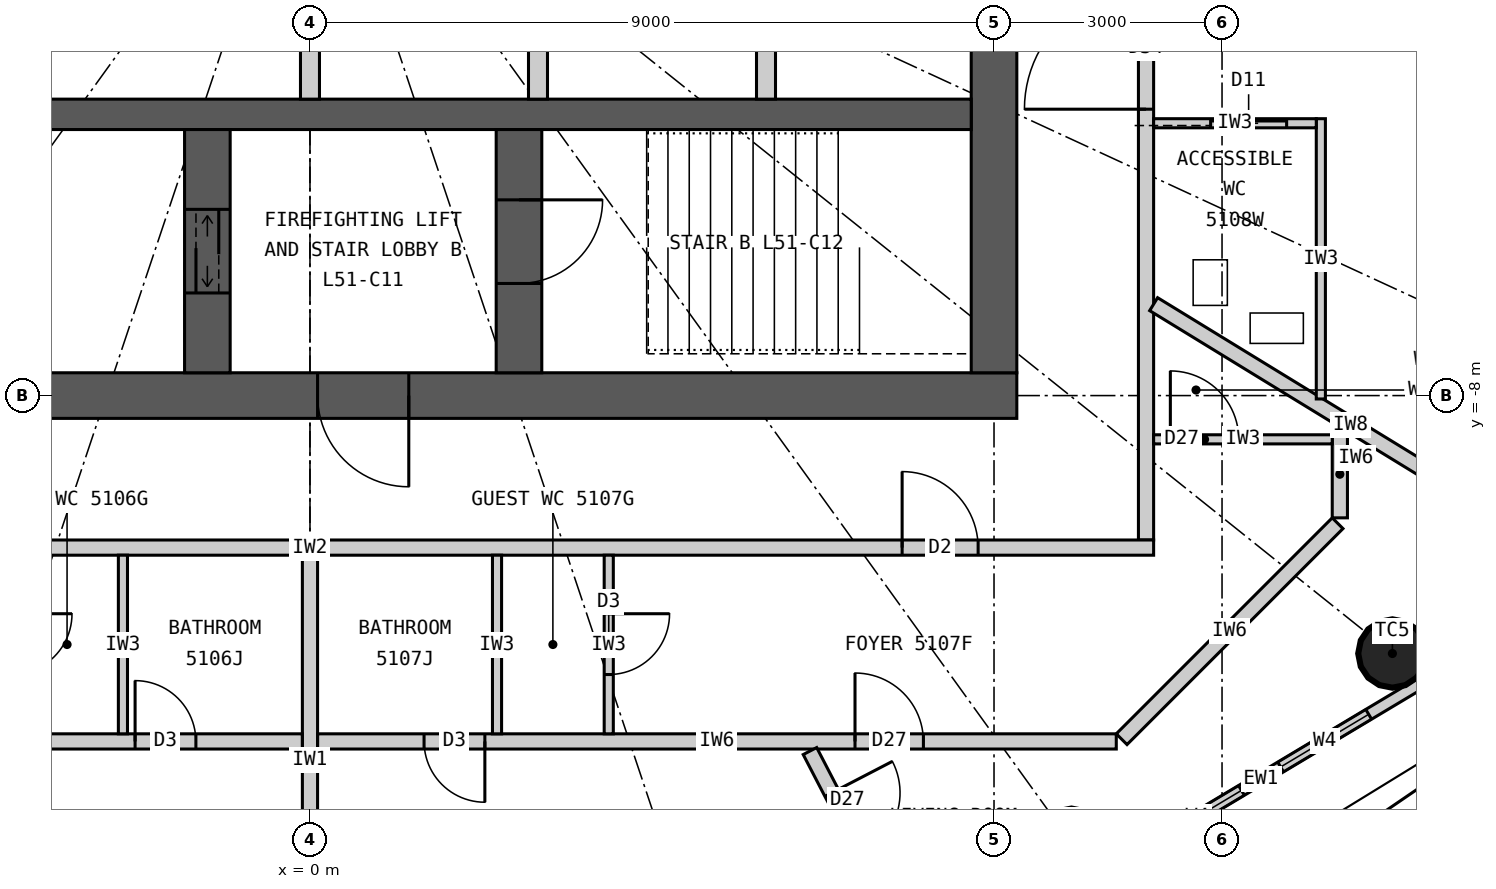
"""IFC4 building model, lengths in metres.
Left out: names, types, materials, properties, quantities, classifications, styles, units other than length and angle.
Written with IfcOpenShell. Run it as: python <this file> out.ifc"""

import sys

from ifc_helpers import new_model, si_unit, direction, frame, frame_2d, origin, origin_2d, place, context, subcontext, project, spatial, rectangle, circle, extrude, element, fill, save


model = new_model("IFC4")
c1 = context("Model", 3, precision=1e-05, world=origin(), true_north=direction((0.0, 1.0)))
c2 = subcontext(c1, "Body", "Model", "MODEL_VIEW")
j1 = project(units=[si_unit("LENGTHUNIT", "METRE"), si_unit("PLANEANGLEUNIT", "RADIAN")], contexts=[c1])
p1 = place(None, origin())
s1 = spatial("IfcSite", under=j1, at=p1, CompositionType="ELEMENT")
p2 = place(p1, origin())
s2 = spatial("IfcBuilding", under=s1, at=p2, CompositionType="ELEMENT")
p3 = place(p2, frame((0.0, 0.0, 192.9)))
s3 = spatial("IfcBuildingStorey", under=s2, at=p3, CompositionType="ELEMENT", Elevation=192.9)
for number, where, z_axis, x_axis in (
    (1, (10.019, -13.883, 0.0), (0.0, 0.0, 1.0), (1.0, 0.0, 0.0)),
    (2, (14.241, -11.393, 0.0), (0.0, 0.0, 1.0), (1.0, 0.0, 0.0)),
):
    element("IfcColumn", number, at=place(p3, frame(where, z_axis=z_axis, x_axis=x_axis)), inside=s3, PredefinedType="COLUMN", context=c2, shape_type="SweptSolid", body=[
        extrude(circle(Radius=0.45, at=origin_2d()), origin(), (0.0, 0.0, 1.0), 3.3),
    ])
p4 = place(p3, frame((9.3, -8.0, 0.0), z_axis=(0.0, 0.0, 1.0), x_axis=(-1.0, 0.0, 0.0)))
e3 = element("IfcWall", 3, at=p4, inside=s3, PredefinedType="SHEAR", context=c2, shape_type="SweptSolid", body=[
    extrude(rectangle(XDim=18.6, YDim=0.6, at=frame_2d((9.3, 0.0))), origin(), (0.0, 0.0, 1.0), 3.3),
])
p5 = place(p4, frame((8.0, 0.0, 0.0)))
e4 = element("IfcOpeningElement", 4, at=p5, cuts=e3, PredefinedType="OPENING", context=c2, shape_type="SweptSolid", body=[
    extrude(rectangle(XDim=1.2, YDim=2.2, at=frame_2d((0.6, 1.1))), frame((0.0, 0.31, 0.0), z_axis=(0.0, -1.0, 0.0), x_axis=(1.0, 0.0, 0.0)), (0.0, 0.0, 1.0), 0.62),
])
p6 = place(p4, frame((15.6, 0.0, 0.0)))
e5 = element("IfcOpeningElement", 5, at=p6, cuts=e3, PredefinedType="OPENING", context=c2, shape_type="SweptSolid", body=[
    extrude(rectangle(XDim=0.9, YDim=2.2, at=frame_2d((0.45, 1.1))), frame((0.0, 0.31, 0.0), z_axis=(0.0, -1.0, 0.0), x_axis=(1.0, 0.0, 0.0)), (0.0, 0.0, 1.0), 0.62),
])
p7 = place(p3, frame((9.0, -7.7, 0.0), z_axis=(0.0, 0.0, 1.0), x_axis=(0.0, 1.0, 0.0)))
e6 = element("IfcWall", 6, at=p7, inside=s3, PredefinedType="SHEAR", context=c2, shape_type="SweptSolid", body=[
    extrude(rectangle(XDim=15.4, YDim=0.6, at=frame_2d((7.7, 0.0))), origin(), (0.0, 0.0, 1.0), 3.3),
])
p8 = place(p7, frame((6.8, 0.0, 0.0)))
e7 = element("IfcOpeningElement", 7, at=p8, cuts=e6, PredefinedType="OPENING", context=c2, shape_type="SweptSolid", body=[
    extrude(rectangle(XDim=1.8, YDim=2.2, at=frame_2d((0.9, 1.1))), frame((0.0, 0.31, 0.0), z_axis=(0.0, -1.0, 0.0), x_axis=(1.0, 0.0, 0.0)), (0.0, 0.0, 1.0), 0.62),
])
p9 = place(p3, frame((-8.7, -4.3, 0.0), z_axis=(0.0, 0.0, 1.0), x_axis=(1.0, 0.0, 0.0)))
e8 = element("IfcWall", 8, at=p9, inside=s3, PredefinedType="SHEAR", context=c2, shape_type="SweptSolid", body=[
    extrude(rectangle(XDim=17.4, YDim=0.4, at=frame_2d((8.7, 0.0))), origin(), (0.0, 0.0, 1.0), 3.3),
])
p10 = place(p3, frame((2.75, -7.7, 0.0), z_axis=(0.0, 0.0, 1.0), x_axis=(0.0, 1.0, 0.0)))
e9 = element("IfcWall", 9, at=p10, inside=s3, PredefinedType="SHEAR", context=c2, shape_type="SweptSolid", body=[
    extrude(rectangle(XDim=3.2, YDim=0.6, at=frame_2d((1.6, 0.0))), origin(), (0.0, 0.0, 1.0), 3.3),
])
p11 = place(p10, frame((1.175, 0.0, 0.0)))
e10 = element("IfcOpeningElement", 10, at=p11, cuts=e9, PredefinedType="OPENING", context=c2, shape_type="SweptSolid", body=[
    extrude(rectangle(XDim=1.1, YDim=2.2, at=frame_2d((0.55, 1.1))), frame((0.0, 0.31, 0.0), z_axis=(0.0, -1.0, 0.0), x_axis=(1.0, 0.0, 0.0)), (0.0, 0.0, 1.0), 0.62),
])
p12 = place(p3, frame((-1.35, -7.7, 0.0), z_axis=(0.0, 0.0, 1.0), x_axis=(0.0, 1.0, 0.0)))
e11 = element("IfcWall", 11, at=p12, inside=s3, PredefinedType="SHEAR", context=c2, shape_type="SweptSolid", body=[
    extrude(rectangle(XDim=3.2, YDim=0.6, at=frame_2d((1.6, 0.0))), origin(), (0.0, 0.0, 1.0), 3.3),
])
p13 = place(p12, frame((1.05, 0.0, 0.0)))
e12 = element("IfcOpeningElement", 12, at=p13, cuts=e11, PredefinedType="OPENING", context=c2, shape_type="SweptSolid", body=[
    extrude(rectangle(XDim=1.1, YDim=2.2, at=frame_2d((0.55, 1.1))), frame((0.0, 0.31, 0.0), z_axis=(0.0, -1.0, 0.0), x_axis=(1.0, 0.0, 0.0)), (0.0, 0.0, 1.0), 0.62),
])
for number, where, z_axis, x_axis in (
    (13, (0.0, -4.1, 0.0), (0.0, 0.0, 1.0), (0.0, 1.0, 0.0)),
    (14, (3.0, -4.1, 0.0), (0.0, 0.0, 1.0), (0.0, 1.0, 0.0)),
    (15, (6.0, -4.1, 0.0), (0.0, 0.0, 1.0), (0.0, 1.0, 0.0)),
):
    element("IfcWall", number, at=place(p3, frame(where, z_axis=z_axis, x_axis=x_axis)), inside=s3, PredefinedType="PARTITIONING", context=c2, shape_type="SweptSolid", body=[
        extrude(rectangle(XDim=2.35, YDim=0.25, at=frame_2d((1.175, 0.0))), origin(), (0.0, 0.0, 1.0), 3.3),
    ])
p14 = place(p3, frame((10.346, -14.336, 0.0), z_axis=(0.0, 0.0, 1.0), x_axis=(0.85822150553, 0.513279502265, 0.0)))
e16 = element("IfcWall", 16, at=p14, inside=s3, PredefinedType="ELEMENTEDWALL", context=c2, shape_type="SweptSolid", body=[
    extrude(rectangle(XDim=5.05, YDim=0.15, at=frame_2d((2.525, 0.0))), origin(), (0.0, 0.0, 1.0), 3.12),
])
p15 = place(p14, frame((0.875, 0.0, 0.9)))
e17 = element("IfcOpeningElement", 17, at=p15, cuts=e16, PredefinedType="OPENING", context=c2, shape_type="SweptSolid", body=[
    extrude(rectangle(XDim=1.35, YDim=1.9, at=frame_2d((0.675, 0.95))), frame((0.0, 0.085, 0.0), z_axis=(0.0, -1.0, 0.0), x_axis=(1.0, 0.0, 0.0)), (0.0, 0.0, 1.0), 0.17),
])
p16 = place(p14, frame((2.825, 0.0, 0.9)))
e18 = element("IfcOpeningElement", 18, at=p16, cuts=e16, PredefinedType="OPENING", context=c2, shape_type="SweptSolid", body=[
    extrude(rectangle(XDim=1.35, YDim=1.9, at=frame_2d((0.675, 0.95))), frame((0.0, 0.085, 0.0), z_axis=(0.0, -1.0, 0.0), x_axis=(1.0, 0.0, 0.0)), (0.0, 0.0, 1.0), 0.17),
])
p17 = place(p3, frame((11.0, -9.9, 0.0), z_axis=(0.0, 0.0, 1.0), x_axis=(0.0, 1.0, 0.0)))
e19 = element("IfcWall", 19, at=p17, inside=s3, PredefinedType="PARTITIONING", context=c2, shape_type="SweptSolid", body=[
    extrude(rectangle(XDim=19.8, YDim=0.2, at=frame_2d((9.9, 0.0))), origin(), (0.0, 0.0, 1.0), 3.12),
])
p18 = place(p17, frame((11.486, 0.0, 0.0)))
e20 = element("IfcOpeningElement", 20, at=p18, cuts=e19, PredefinedType="OPENING", context=c2, shape_type="SweptSolid", body=[
    extrude(rectangle(XDim=1.0, YDim=2.2, at=frame_2d((0.5, 1.1))), frame((0.0, 0.11, 0.0), z_axis=(0.0, -1.0, 0.0), x_axis=(1.0, 0.0, 0.0)), (0.0, 0.0, 1.0), 0.22),
])
p19 = place(p17, frame((18.645, 0.0, 0.0)))
e21 = element("IfcOpeningElement", 21, at=p19, cuts=e19, PredefinedType="OPENING", context=c2, shape_type="SweptSolid", body=[
    extrude(rectangle(XDim=1.0, YDim=2.2, at=frame_2d((0.5, 1.1))), frame((0.0, 0.11, 0.0), z_axis=(0.0, -1.0, 0.0), x_axis=(1.0, 0.0, 0.0)), (0.0, 0.0, 1.0), 0.22),
])
p20 = place(p17, frame((5.668, 0.0, 0.0)))
e22 = element("IfcOpeningElement", 22, at=p20, cuts=e19, PredefinedType="OPENING", context=c2, shape_type="SweptSolid", body=[
    extrude(rectangle(XDim=1.6, YDim=2.2, at=frame_2d((0.8, 1.1))), frame((0.0, 0.11, 0.0), z_axis=(0.0, -1.0, 0.0), x_axis=(1.0, 0.0, 0.0)), (0.0, 0.0, 1.0), 0.22),
])
p21 = place(p3, frame((11.1, -10.0, 0.0), z_axis=(0.0, 0.0, 1.0), x_axis=(-1.0, 0.0, 0.0)))
e23 = element("IfcWall", 23, at=p21, inside=s3, PredefinedType="PARTITIONING", context=c2, shape_type="SweptSolid", body=[
    extrude(rectangle(XDim=22.2, YDim=0.2, at=frame_2d((11.1, 0.0))), origin(), (0.0, 0.0, 1.0), 3.12),
])
p22 = place(p21, frame((18.864, 0.0, 0.0)))
e24 = element("IfcOpeningElement", 24, at=p22, cuts=e23, PredefinedType="OPENING", context=c2, shape_type="SweptSolid", body=[
    extrude(rectangle(XDim=1.0, YDim=2.2, at=frame_2d((0.5, 1.1))), frame((0.0, 0.11, 0.0), z_axis=(0.0, -1.0, 0.0), x_axis=(1.0, 0.0, 0.0)), (0.0, 0.0, 1.0), 0.22),
])
p23 = place(p21, frame((2.309, 0.0, 0.0)))
e25 = element("IfcOpeningElement", 25, at=p23, cuts=e23, PredefinedType="OPENING", context=c2, shape_type="SweptSolid", body=[
    extrude(rectangle(XDim=1.0, YDim=2.2, at=frame_2d((0.5, 1.1))), frame((0.0, 0.11, 0.0), z_axis=(0.0, -1.0, 0.0), x_axis=(1.0, 0.0, 0.0)), (0.0, 0.0, 1.0), 0.22),
])
p24 = place(p3, frame((0.0, -10.1, 0.0), z_axis=(0.0, 0.0, 1.0), x_axis=(0.0, -1.0, 0.0)))
e26 = element("IfcWall", 26, at=p24, inside=s3, PredefinedType="PARTITIONING", context=c2, shape_type="SweptSolid", body=[
    extrude(rectangle(XDim=5.4, YDim=0.2, at=frame_2d((2.7, 0.0))), origin(), (0.0, 0.0, 1.0), 2.27),
])
p25 = place(p3, frame((11.1, -6.797, 0.0), z_axis=(0.0, 0.0, 1.0), x_axis=(0.852799818179, -0.522237943963, 0.0)))
e27 = element("IfcWall", 27, at=p25, inside=s3, PredefinedType="PARTITIONING", context=c2, shape_type="SweptSolid", body=[
    extrude(rectangle(XDim=6.077, YDim=0.2, at=frame_2d((3.039, 0.0))), origin(), (0.0, 0.0, 1.0), 3.12),
])
p26 = place(p3, frame((-10.609, -12.55, 0.0), z_axis=(0.0, 0.0, 1.0), x_axis=(1.0, 0.0, 0.0)))
e28 = element("IfcWall", 28, at=p26, inside=s3, PredefinedType="PARTITIONING", context=c2, shape_type="SweptSolid", body=[
    extrude(rectangle(XDim=10.508, YDim=0.2, at=frame_2d((5.254, 0.0))), origin(), (0.0, 0.0, 1.0), 3.12),
])
p27 = place(p26, frame((8.308, 0.0, 0.0)))
e29 = element("IfcOpeningElement", 29, at=p27, cuts=e28, PredefinedType="OPENING", context=c2, shape_type="SweptSolid", body=[
    extrude(rectangle(XDim=0.8, YDim=2.1, at=frame_2d((0.4, 1.05))), frame((0.0, 0.11, 0.0), z_axis=(0.0, -1.0, 0.0), x_axis=(1.0, 0.0, 0.0)), (0.0, 0.0, 1.0), 0.22),
])
p28 = place(p3, frame((-2.461, -10.1, 0.0), z_axis=(0.0, 0.0, 1.0), x_axis=(0.0, -1.0, 0.0)))
e30 = element("IfcWall", 30, at=p28, inside=s3, PredefinedType="PARTITIONING", context=c2, shape_type="SweptSolid", body=[
    extrude(rectangle(XDim=2.35, YDim=0.12, at=frame_2d((1.175, 0.0))), origin(), (0.0, 0.0, 1.0), 3.12),
])
p29 = place(p3, frame((0.101, -12.55, 0.0), z_axis=(0.0, 0.0, 1.0), x_axis=(1.0, 0.0, 0.0)))
e31 = element("IfcWall", 31, at=p29, inside=s3, PredefinedType="PARTITIONING", context=c2, shape_type="SweptSolid", body=[
    extrude(rectangle(XDim=10.508, YDim=0.2, at=frame_2d((5.254, 0.0))), origin(), (0.0, 0.0, 1.0), 3.12),
])
p30 = place(p29, frame((1.4, 0.0, 0.0)))
e32 = element("IfcOpeningElement", 32, at=p30, cuts=e31, PredefinedType="OPENING", context=c2, shape_type="SweptSolid", body=[
    extrude(rectangle(XDim=0.8, YDim=2.1, at=frame_2d((0.4, 1.05))), frame((0.0, 0.11, 0.0), z_axis=(0.0, -1.0, 0.0), x_axis=(1.0, 0.0, 0.0)), (0.0, 0.0, 1.0), 0.22),
])
p31 = place(p29, frame((7.07, 0.0, 0.0)))
e33 = element("IfcOpeningElement", 33, at=p31, cuts=e31, PredefinedType="OPENING", context=c2, shape_type="SweptSolid", body=[
    extrude(rectangle(XDim=0.9, YDim=2.1, at=frame_2d((0.45, 1.05))), frame((0.0, 0.11, 0.0), z_axis=(0.0, -1.0, 0.0), x_axis=(1.0, 0.0, 0.0)), (0.0, 0.0, 1.0), 0.22),
])
p32 = place(p3, frame((10.679, -12.521, 0.0), z_axis=(0.0, 0.0, 1.0), x_axis=(0.707106781187, 0.707106781187, 0.0)))
e34 = element("IfcWall", 34, at=p32, inside=s3, PredefinedType="PARTITIONING", context=c2, shape_type="SweptSolid", body=[
    extrude(rectangle(XDim=4.019, YDim=0.2, at=frame_2d((2.009, 0.0))), origin(), (0.0, 0.0, 1.0), 3.12),
])
p33 = place(p3, frame((13.55, -9.609, 0.0), z_axis=(0.0, 0.0, 1.0), x_axis=(0.0, 1.0, 0.0)))
e35 = element("IfcWall", 35, at=p33, inside=s3, PredefinedType="PARTITIONING", context=c2, shape_type="SweptSolid", body=[
    extrude(rectangle(XDim=1.148, YDim=0.2, at=frame_2d((0.574, 0.0))), origin(), (0.0, 0.0, 1.0), 3.12),
])
p34 = place(p3, frame((6.578, -12.677, 0.0), z_axis=(0.0, 0.0, 1.0), x_axis=(0.460620531465, -0.887597164255, 0.0)))
e36 = element("IfcWall", 36, at=p34, inside=s3, PredefinedType="PARTITIONING", context=c2, shape_type="SweptSolid", body=[
    extrude(rectangle(XDim=2.678, YDim=0.2, at=frame_2d((1.339, 0.0))), origin(), (0.0, 0.0, 1.0), 3.12),
])
p35 = place(p34, frame((0.62, 0.0, 0.0)))
e37 = element("IfcOpeningElement", 37, at=p35, cuts=e36, PredefinedType="OPENING", context=c2, shape_type="SweptSolid", body=[
    extrude(rectangle(XDim=0.9, YDim=2.1, at=frame_2d((0.45, 1.05))), frame((0.0, 0.11, 0.0), z_axis=(0.0, -1.0, 0.0), x_axis=(1.0, 0.0, 0.0)), (0.0, 0.0, 1.0), 0.22),
])
p36 = place(p3, frame((2.461, -10.1, 0.0), z_axis=(0.0, 0.0, 1.0), x_axis=(0.0, -1.0, 0.0)))
e38 = element("IfcWall", 38, at=p36, inside=s3, PredefinedType="PARTITIONING", context=c2, shape_type="SweptSolid", body=[
    extrude(rectangle(XDim=2.35, YDim=0.12, at=frame_2d((1.175, 0.0))), origin(), (0.0, 0.0, 1.0), 3.12),
])
p37 = place(p3, frame((3.931, -10.1, 0.0), z_axis=(0.0, 0.0, 1.0), x_axis=(0.0, -1.0, 0.0)))
e39 = element("IfcWall", 39, at=p37, inside=s3, PredefinedType="PARTITIONING", context=c2, shape_type="SweptSolid", body=[
    extrude(rectangle(XDim=2.35, YDim=0.12, at=frame_2d((1.175, 0.0))), origin(), (0.0, 0.0, 1.0), 3.12),
])
p38 = place(p37, frame((0.77, 0.0, 0.0)))
e40 = element("IfcOpeningElement", 40, at=p38, cuts=e39, PredefinedType="OPENING", context=c2, shape_type="SweptSolid", body=[
    extrude(rectangle(XDim=0.8, YDim=2.1, at=frame_2d((0.4, 1.05))), frame((0.0, 0.07, 0.0), z_axis=(0.0, -1.0, 0.0), x_axis=(1.0, 0.0, 0.0)), (0.0, 0.0, 1.0), 0.14),
])
p39 = place(p3, frame((11.1, -8.576, 0.0), z_axis=(0.0, 0.0, 1.0), x_axis=(1.0, 0.0, 0.0)))
e41 = element("IfcWall", 41, at=p39, inside=s3, PredefinedType="PARTITIONING", context=c2, shape_type="SweptSolid", body=[
    extrude(rectangle(XDim=2.35, YDim=0.12, at=frame_2d((1.175, 0.0))), origin(), (0.0, 0.0, 1.0), 3.12),
])
p40 = place(p39, frame((0.22, 0.0, 0.0)))
e42 = element("IfcOpeningElement", 42, at=p40, cuts=e41, PredefinedType="OPENING", context=c2, shape_type="SweptSolid", body=[
    extrude(rectangle(XDim=0.9, YDim=2.1, at=frame_2d((0.45, 1.05))), frame((0.0, 0.07, 0.0), z_axis=(0.0, -1.0, 0.0), x_axis=(1.0, 0.0, 0.0)), (0.0, 0.0, 1.0), 0.14),
])
p41 = place(p3, frame((13.3, -8.044, 0.0), z_axis=(0.0, 0.0, 1.0), x_axis=(0.0, 1.0, 0.0)))
e43 = element("IfcWall", 43, at=p41, inside=s3, PredefinedType="PARTITIONING", context=c2, shape_type="SweptSolid", body=[
    extrude(rectangle(XDim=3.687, YDim=0.12, at=frame_2d((1.844, 0.0))), origin(), (0.0, 0.0, 1.0), 3.12),
])
p42 = place(p3, frame((11.1, -4.417, 0.0), z_axis=(0.0, 0.0, 1.0), x_axis=(1.0, 0.0, 0.0)))
e44 = element("IfcWall", 44, at=p42, inside=s3, PredefinedType="PARTITIONING", context=c2, shape_type="SweptSolid", body=[
    extrude(rectangle(XDim=2.14, YDim=0.12, at=frame_2d((1.07, 0.0))), origin(), (0.0, 0.0, 1.0), 2.37),
])
p43 = place(p42, frame((0.75, 0.0, 0.0)))
e45 = element("IfcOpeningElement", 45, at=p43, cuts=e44, PredefinedType="OPENING", context=c2, shape_type="SweptSolid", body=[
    extrude(rectangle(XDim=1.0, YDim=2.2, at=frame_2d((0.5, 1.1))), frame((0.0, 0.07, 0.0), z_axis=(0.0, -1.0, 0.0), x_axis=(1.0, 0.0, 0.0)), (0.0, 0.0, 1.0), 0.14),
])
p44 = place(p15, origin())
e46 = element("IfcWindow", 46, at=p44, inside=s3, PartitioningType="SINGLE_PANEL", PredefinedType="WINDOW", context=c2, shape_type="SweptSolid", body=[
    extrude(rectangle(XDim=1.35, YDim=1.9, at=frame_2d((0.675, 0.95))), frame((0.0, 0.03, 0.0), z_axis=(0.0, -1.0, 0.0), x_axis=(1.0, 0.0, 0.0)), (0.0, 0.0, 1.0), 0.06),
])
fill(e17, e46)
p45 = place(p16, origin())
e47 = element("IfcWindow", 47, at=p45, inside=s3, PartitioningType="SINGLE_PANEL", PredefinedType="WINDOW", context=c2, shape_type="SweptSolid", body=[
    extrude(rectangle(XDim=1.35, YDim=1.9, at=frame_2d((0.675, 0.95))), frame((0.0, 0.03, 0.0), z_axis=(0.0, -1.0, 0.0), x_axis=(1.0, 0.0, 0.0)), (0.0, 0.0, 1.0), 0.06),
])
fill(e18, e47)
p46 = place(p27, origin())
e48 = element("IfcDoor", 48, at=p46, inside=s3, OperationType="SINGLE_SWING_LEFT", PredefinedType="DOOR", context=c2, shape_type="SweptSolid", body=[
    extrude(rectangle(XDim=0.8, YDim=2.1, at=frame_2d((0.4, 1.05))), frame((0.0, 0.025, 0.0), z_axis=(0.0, -1.0, 0.0), x_axis=(1.0, 0.0, 0.0)), (0.0, 0.0, 1.0), 0.05),
])
fill(e29, e48)
p47 = place(p23, origin())
e49 = element("IfcDoor", 49, at=p47, inside=s3, OperationType="SINGLE_SWING_RIGHT", PredefinedType="DOOR", context=c2, shape_type="SweptSolid", body=[
    extrude(rectangle(XDim=1.0, YDim=2.2, at=frame_2d((0.5, 1.1))), frame((0.0, 0.025, 0.0), z_axis=(0.0, -1.0, 0.0), x_axis=(1.0, 0.0, 0.0)), (0.0, 0.0, 1.0), 0.05),
])
fill(e25, e49)
p48 = place(p30, origin())
e50 = element("IfcDoor", 50, at=p48, inside=s3, OperationType="SINGLE_SWING_RIGHT", PredefinedType="DOOR", context=c2, shape_type="SweptSolid", body=[
    extrude(rectangle(XDim=0.8, YDim=2.1, at=frame_2d((0.4, 1.05))), frame((0.0, 0.025, 0.0), z_axis=(0.0, -1.0, 0.0), x_axis=(1.0, 0.0, 0.0)), (0.0, 0.0, 1.0), 0.05),
])
fill(e32, e50)
p49 = place(p38, origin())
e51 = element("IfcDoor", 51, at=p49, inside=s3, OperationType="SINGLE_SWING_LEFT", PredefinedType="DOOR", context=c2, shape_type="SweptSolid", body=[
    extrude(rectangle(XDim=0.8, YDim=2.1, at=frame_2d((0.4, 1.05))), frame((0.0, 0.025, 0.0), z_axis=(0.0, -1.0, 0.0), x_axis=(1.0, 0.0, 0.0)), (0.0, 0.0, 1.0), 0.05),
])
fill(e40, e51)
p50 = place(p40, origin())
e52 = element("IfcDoor", 52, at=p50, inside=s3, OperationType="SINGLE_SWING_LEFT", PredefinedType="DOOR", context=c2, shape_type="SweptSolid", body=[
    extrude(rectangle(XDim=0.9, YDim=2.1, at=frame_2d((0.45, 1.05))), frame((0.0, 0.025, 0.0), z_axis=(0.0, -1.0, 0.0), x_axis=(1.0, 0.0, 0.0)), (0.0, 0.0, 1.0), 0.05),
])
fill(e42, e52)
p51 = place(p31, origin())
e53 = element("IfcDoor", 53, at=p51, inside=s3, OperationType="SINGLE_SWING_LEFT", PredefinedType="DOOR", context=c2, shape_type="SweptSolid", body=[
    extrude(rectangle(XDim=0.9, YDim=2.1, at=frame_2d((0.45, 1.05))), frame((0.0, 0.025, 0.0), z_axis=(0.0, -1.0, 0.0), x_axis=(1.0, 0.0, 0.0)), (0.0, 0.0, 1.0), 0.05),
])
fill(e33, e53)
p52 = place(p35, origin())
e54 = element("IfcDoor", 54, at=p52, inside=s3, OperationType="SINGLE_SWING_LEFT", PredefinedType="DOOR", context=c2, shape_type="SweptSolid", body=[
    extrude(rectangle(XDim=0.9, YDim=2.1, at=frame_2d((0.45, 1.05))), frame((0.0, 0.025, 0.0), z_axis=(0.0, -1.0, 0.0), x_axis=(1.0, 0.0, 0.0)), (0.0, 0.0, 1.0), 0.05),
])
fill(e37, e54)
p53 = place(p43, origin())
e55 = element("IfcDoor", 55, at=p53, inside=s3, OperationType="SLIDING_TO_LEFT", PredefinedType="DOOR", context=c2, shape_type="SweptSolid", body=[
    extrude(rectangle(XDim=1.0, YDim=2.2, at=frame_2d((0.5, 1.1))), frame((0.0, 0.025, 0.0), z_axis=(0.0, -1.0, 0.0), x_axis=(1.0, 0.0, 0.0)), (0.0, 0.0, 1.0), 0.05),
])
fill(e45, e55)
p54 = place(p20, origin())
e56 = element("IfcDoor", 56, at=p54, inside=s3, OperationType="DOUBLE_DOOR_DOUBLE_SWING", PredefinedType="DOOR", context=c2, shape_type="SweptSolid", body=[
    extrude(rectangle(XDim=1.6, YDim=2.2, at=frame_2d((0.8, 1.1))), frame((0.0, 0.025, 0.0), z_axis=(0.0, -1.0, 0.0), x_axis=(1.0, 0.0, 0.0)), (0.0, 0.0, 1.0), 0.05),
])
fill(e22, e56)
p55 = place(p5, origin())
e57 = element("IfcDoor", 57, at=p55, inside=s3, OperationType="SINGLE_SWING_LEFT", PredefinedType="DOOR", context=c2, shape_type="SweptSolid", body=[
    extrude(rectangle(XDim=1.2, YDim=2.2, at=frame_2d((0.6, 1.1))), frame((0.0, 0.025, 0.0), z_axis=(0.0, -1.0, 0.0), x_axis=(1.0, 0.0, 0.0)), (0.0, 0.0, 1.0), 0.05),
])
fill(e4, e57)
p56 = place(p11, origin())
e58 = element("IfcDoor", 58, at=p56, inside=s3, OperationType="SINGLE_SWING_RIGHT", PredefinedType="DOOR", context=c2, shape_type="SweptSolid", body=[
    extrude(rectangle(XDim=1.1, YDim=2.2, at=frame_2d((0.55, 1.1))), frame((0.0, 0.025, 0.0), z_axis=(0.0, -1.0, 0.0), x_axis=(1.0, 0.0, 0.0)), (0.0, 0.0, 1.0), 0.05),
])
fill(e10, e58)
p57 = place(p13, origin())
e59 = element("IfcDoor", 59, at=p57, inside=s3, OperationType="DOUBLE_DOOR_SLIDING", PredefinedType="DOOR", context=c2, shape_type="SweptSolid", body=[
    extrude(rectangle(XDim=1.1, YDim=2.2, at=frame_2d((0.55, 1.1))), frame((0.0, 0.025, 0.0), z_axis=(0.0, -1.0, 0.0), x_axis=(1.0, 0.0, 0.0)), (0.0, 0.0, 1.0), 0.05),
])
fill(e12, e59)
save(model, sys.argv[1])
